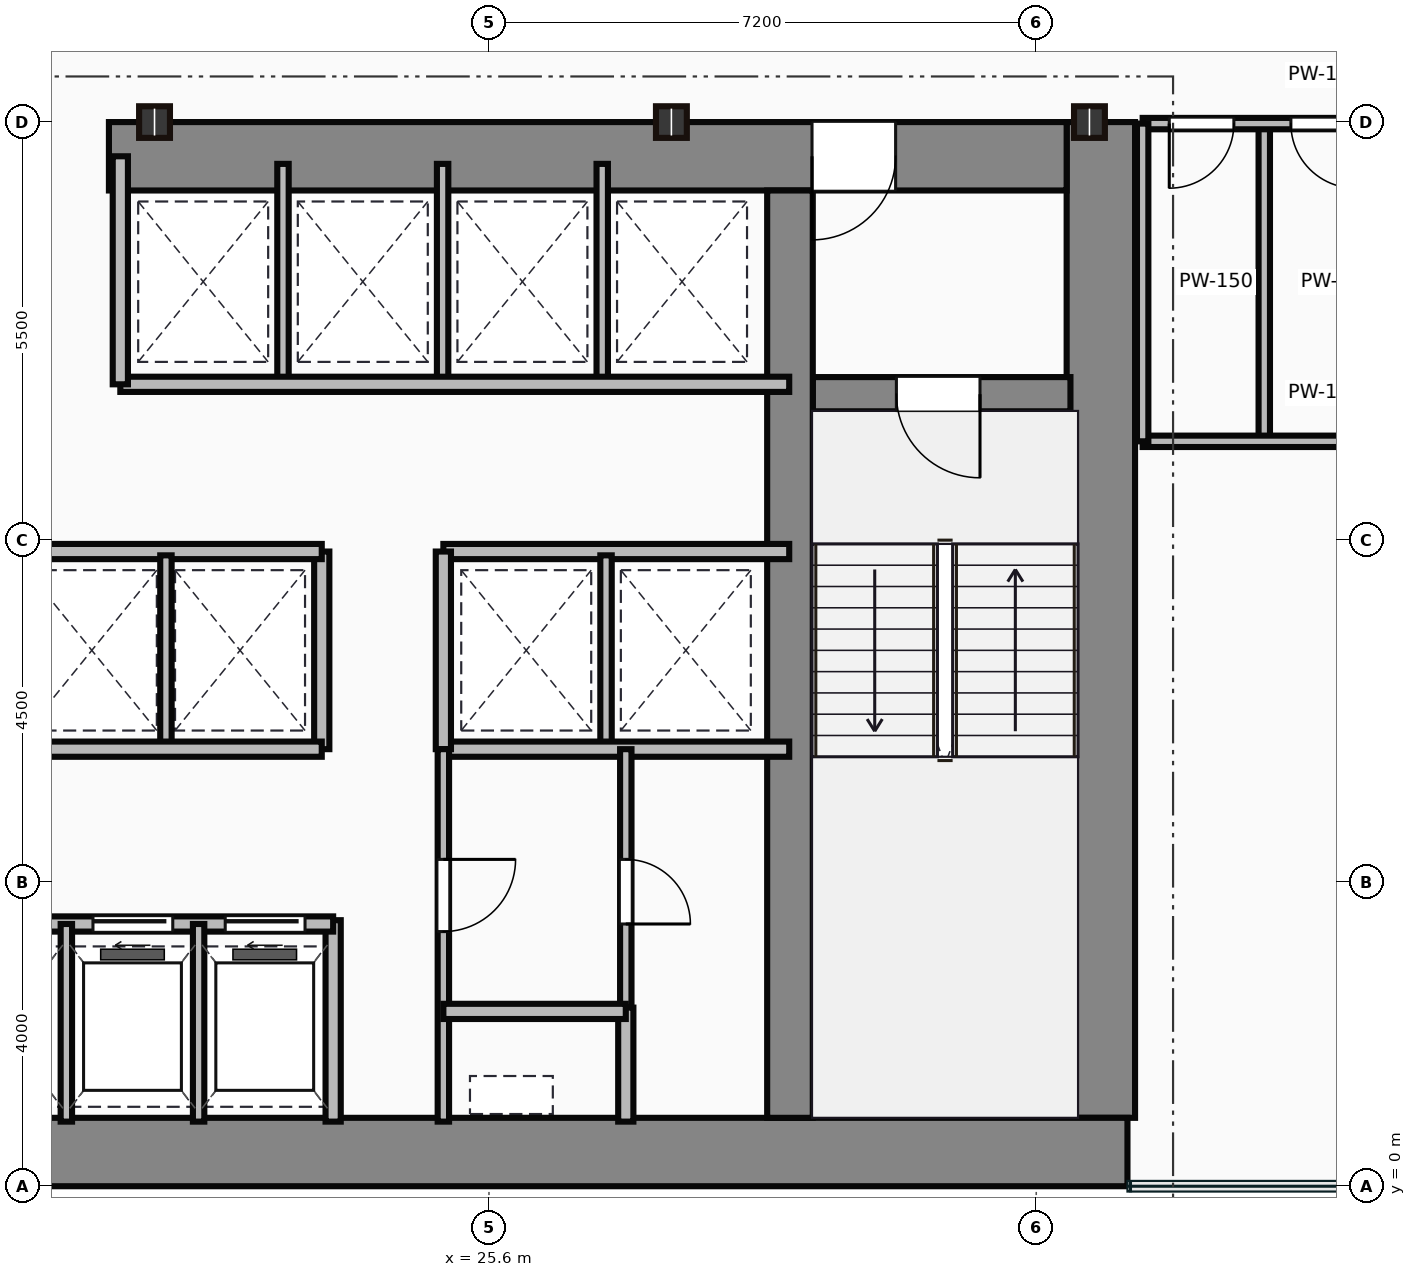
"""IFC4 building model, lengths in metres.
Left out: names, types, materials, properties, quantities, classifications, styles, units other than length and angle.
Written with IfcOpenShell. Run it as: python <this file> out.ifc"""

import sys

from ifc_helpers import new_model, si_unit, direction, frame, frame_2d, origin, origin_2d, place, context, subcontext, project, spatial, rectangle, i_section, extrude, source, transform, mapped, element, fill, save


model = new_model("IFC4")
c1 = context("Model", 3, precision=1e-05, world=origin(), true_north=direction((0.0, 1.0)))
c2 = subcontext(c1, "Body", "Model", "MODEL_VIEW")
j1 = project(units=[si_unit("LENGTHUNIT", "METRE"), si_unit("PLANEANGLEUNIT", "RADIAN")], contexts=[c1])
p1 = place(None, origin())
s1 = spatial("IfcSite", under=j1, at=p1, CompositionType="ELEMENT")
p2 = place(p1, origin())
s2 = spatial("IfcBuilding", under=s1, at=p2, CompositionType="ELEMENT")
p3 = place(p2, frame((0.0, 0.0, 65.35)))
s3 = spatial("IfcBuildingStorey", under=s2, at=p3, CompositionType="ELEMENT", Elevation=65.35)
m1 = source(origin(), c2, "Body", "SweptSolid", [
    extrude(rectangle(XDim=29.5, YDim=0.9, at=frame_2d((14.75, 0.0))), origin(), (0.0, 0.0, 1.0), 3.65),
])
p4 = place(p3, frame((4.5, 0.45, 0.0), z_axis=(0.0, 0.0, 1.0), x_axis=(1.0, 0.0, 0.0)))
e1 = element("IfcWall", 1, at=p4, inside=s3, PredefinedType="SHEAR", context=c2, shape_type="MappedRepresentation", body=[
    mapped(m1, transform((0.0, 0.0, 0.0))),
])
m2 = source(origin(), c2, "Body", "SweptSolid", [
    extrude(rectangle(XDim=13.1, YDim=0.9, at=frame_2d((6.55, 0.0))), origin(), (0.0, 0.0, 1.0), 3.65),
])
p5 = place(p3, frame((33.65, 0.9, 0.0), z_axis=(0.0, 0.0, 1.0), x_axis=(0.0, 1.0, 0.0)))
e2 = element("IfcWall", 2, at=p5, inside=s3, PredefinedType="SHEAR", context=c2, shape_type="MappedRepresentation", body=[
    mapped(m2, transform((0.0, 0.0, 0.0))),
])
m3 = source(origin(), c2, "Body", "SweptSolid", [
    extrude(rectangle(XDim=12.6, YDim=0.9, at=frame_2d((6.3, 0.0))), origin(), (0.0, 0.0, 1.0), 3.65),
])
p6 = place(p3, frame((20.6, 13.55, 0.0), z_axis=(0.0, 0.0, 1.0), x_axis=(1.0, 0.0, 0.0)))
e3 = element("IfcWall", 3, at=p6, inside=s3, PredefinedType="SHEAR", context=c2, shape_type="MappedRepresentation", body=[
    mapped(m3, transform((0.0, 0.0, 0.0))),
])
p7 = place(p6, frame((9.25, 0.0, 0.0)))
e4 = element("IfcOpeningElement", 4, at=p7, cuts=e3, PredefinedType="OPENING", context=c2, shape_type="SweptSolid", body=[
    extrude(rectangle(XDim=1.1, YDim=2.15, at=frame_2d((0.55, 1.075))), frame((0.0, 0.46, 0.0), z_axis=(0.0, -1.0, 0.0), x_axis=(1.0, 0.0, 0.0)), (0.0, 0.0, 1.0), 0.92),
])
m4 = source(origin(), c2, "Body", "SweptSolid", [
    extrude(rectangle(XDim=12.2, YDim=0.6, at=frame_2d((6.1, 0.0))), origin(), (0.0, 0.0, 1.0), 3.65),
])
p8 = place(p3, frame((29.56, 0.9, 0.0), z_axis=(0.0, 0.0, 1.0), x_axis=(0.0, 1.0, 0.0)))
e5 = element("IfcWall", 5, at=p8, inside=s3, PredefinedType="SHEAR", context=c2, shape_type="MappedRepresentation", body=[
    mapped(m4, transform((0.0, 0.0, 0.0))),
])
m5 = source(origin(), c2, "Body", "SweptSolid", [
    extrude(rectangle(XDim=3.39, YDim=0.45, at=frame_2d((1.695, 0.0))), origin(), (0.0, 0.0, 1.0), 3.65),
])
p9 = place(p3, frame((29.86, 10.42, 0.0), z_axis=(0.0, 0.0, 1.0), x_axis=(1.0, 0.0, 0.0)))
e6 = element("IfcWall", 6, at=p9, inside=s3, PredefinedType="SHEAR", context=c2, shape_type="MappedRepresentation", body=[
    mapped(m5, transform((0.0, 0.0, 0.0))),
])
p10 = place(p9, frame((1.1, 0.0, 0.0)))
e7 = element("IfcOpeningElement", 7, at=p10, cuts=e6, PredefinedType="OPENING", context=c2, shape_type="SweptSolid", body=[
    extrude(rectangle(XDim=1.1, YDim=2.15, at=frame_2d((0.55, 1.075))), frame((0.0, 0.235, 0.0), z_axis=(0.0, -1.0, 0.0), x_axis=(1.0, 0.0, 0.0)), (0.0, 0.0, 1.0), 0.47),
])
m6 = source(origin(), c2, "Body", "SweptSolid", [
    extrude(i_section(OverallWidth=0.406, OverallDepth=0.416, WebThickness=0.03, FlangeThickness=0.048, at=origin_2d()), origin(), (0.0, 0.0, 1.0), 3.65),
])
for number, where, z_axis, x_axis in (
    (8, (21.2, 14.0, 0.0), (0.0, 0.0, 1.0), (1.0, 0.0, 0.0)),
    (9, (28.0, 14.0, 0.0), (0.0, 0.0, 1.0), (1.0, 0.0, 0.0)),
    (10, (33.5, 14.0, 0.0), (0.0, 0.0, 1.0), (1.0, 0.0, 0.0)),
):
    element("IfcColumn", number, at=place(p3, frame(where, z_axis=z_axis, x_axis=x_axis)), inside=s3, PredefinedType="COLUMN", context=c2, shape_type="MappedRepresentation", body=[
        mapped(m6, transform((0.0, 0.0, 0.0))),
    ])
m7 = source(origin(), c2, "Body", "SweptSolid", [
    extrude(rectangle(XDim=10.5, YDim=0.2, at=frame_2d((5.25, 0.0))), origin(), (0.0, 0.0, 1.0), 3.4),
])
p11 = place(p3, frame((13.05, 3.45, 0.0), z_axis=(0.0, 0.0, 1.0), x_axis=(1.0, 0.0, 0.0)))
e11 = element("IfcWall", 11, at=p11, inside=s3, PredefinedType="PARTITIONING", context=c2, shape_type="MappedRepresentation", body=[
    mapped(m7, transform((0.0, 0.0, 0.0))),
])
p12 = place(p11, frame((0.38, 0.0, 0.0)))
e12 = element("IfcOpeningElement", 12, at=p12, cuts=e11, PredefinedType="OPENING", context=c2, shape_type="SweptSolid", body=[
    extrude(rectangle(XDim=1.05, YDim=2.15, at=frame_2d((0.525, 1.075))), frame((0.0, 0.11, 0.0), z_axis=(0.0, -1.0, 0.0), x_axis=(1.0, 0.0, 0.0)), (0.0, 0.0, 1.0), 0.22),
])
p13 = place(p11, frame((2.12, 0.0, 0.0)))
e13 = element("IfcOpeningElement", 13, at=p13, cuts=e11, PredefinedType="OPENING", context=c2, shape_type="SweptSolid", body=[
    extrude(rectangle(XDim=1.05, YDim=2.15, at=frame_2d((0.525, 1.075))), frame((0.0, 0.11, 0.0), z_axis=(0.0, -1.0, 0.0), x_axis=(1.0, 0.0, 0.0)), (0.0, 0.0, 1.0), 0.22),
])
p14 = place(p11, frame((3.86, 0.0, 0.0)))
e14 = element("IfcOpeningElement", 14, at=p14, cuts=e11, PredefinedType="OPENING", context=c2, shape_type="SweptSolid", body=[
    extrude(rectangle(XDim=1.05, YDim=2.15, at=frame_2d((0.525, 1.075))), frame((0.0, 0.11, 0.0), z_axis=(0.0, -1.0, 0.0), x_axis=(1.0, 0.0, 0.0)), (0.0, 0.0, 1.0), 0.22),
])
p15 = place(p11, frame((5.6, 0.0, 0.0)))
e15 = element("IfcOpeningElement", 15, at=p15, cuts=e11, PredefinedType="OPENING", context=c2, shape_type="SweptSolid", body=[
    extrude(rectangle(XDim=1.05, YDim=2.15, at=frame_2d((0.525, 1.075))), frame((0.0, 0.11, 0.0), z_axis=(0.0, -1.0, 0.0), x_axis=(1.0, 0.0, 0.0)), (0.0, 0.0, 1.0), 0.22),
])
p16 = place(p11, frame((7.34, 0.0, 0.0)))
e16 = element("IfcOpeningElement", 16, at=p16, cuts=e11, PredefinedType="OPENING", context=c2, shape_type="SweptSolid", body=[
    extrude(rectangle(XDim=1.05, YDim=2.15, at=frame_2d((0.525, 1.075))), frame((0.0, 0.11, 0.0), z_axis=(0.0, -1.0, 0.0), x_axis=(1.0, 0.0, 0.0)), (0.0, 0.0, 1.0), 0.22),
])
p17 = place(p11, frame((9.08, 0.0, 0.0)))
e17 = element("IfcOpeningElement", 17, at=p17, cuts=e11, PredefinedType="OPENING", context=c2, shape_type="SweptSolid", body=[
    extrude(rectangle(XDim=1.05, YDim=2.15, at=frame_2d((0.525, 1.075))), frame((0.0, 0.11, 0.0), z_axis=(0.0, -1.0, 0.0), x_axis=(1.0, 0.0, 0.0)), (0.0, 0.0, 1.0), 0.22),
])
m8 = source(origin(), c2, "Body", "SweptSolid", [
    extrude(rectangle(XDim=2.65, YDim=0.2, at=frame_2d((1.325, 0.0))), origin(), (0.0, 0.0, 1.0), 3.4),
])
p18 = place(p3, frame((23.55, 0.85, 0.0), z_axis=(0.0, 0.0, 1.0), x_axis=(0.0, 1.0, 0.0)))
e18 = element("IfcWall", 18, at=p18, inside=s3, PredefinedType="PARTITIONING", context=c2, shape_type="MappedRepresentation", body=[
    mapped(m8, transform((0.0, 0.0, 0.0))),
])
m9 = source(origin(), c2, "Body", "SweptSolid", [
    extrude(rectangle(XDim=2.6, YDim=0.15, at=frame_2d((1.3, 0.0))), origin(), (0.0, 0.0, 1.0), 3.4),
])
for number, where, z_axis, x_axis in (
    (19, (20.04, 0.85, 0.0), (0.0, 0.0, 1.0), (0.0, 1.0, 0.0)),
    (20, (21.78, 0.85, 0.0), (0.0, 0.0, 1.0), (0.0, 1.0, 0.0)),
):
    element("IfcWall", number, at=place(p3, frame(where, z_axis=z_axis, x_axis=x_axis)), inside=s3, PredefinedType="PARTITIONING", context=c2, shape_type="MappedRepresentation", body=[
        mapped(m9, transform((0.0, 0.0, 0.0))),
    ])
m10 = source(origin(), c2, "Body", "SweptSolid", [
    extrude(rectangle(XDim=11.85, YDim=0.2, at=frame_2d((5.925, 0.0))), origin(), (0.0, 0.0, 1.0), 3.4),
])
for number, where, z_axis, x_axis in (
    (21, (11.55, 5.75, 0.0), (0.0, 0.0, 1.0), (1.0, 0.0, 0.0)),
    (22, (11.55, 8.35, 0.0), (0.0, 0.0, 1.0), (1.0, 0.0, 0.0)),
):
    element("IfcWall", number, at=place(p3, frame(where, z_axis=z_axis, x_axis=x_axis)), inside=s3, PredefinedType="PARTITIONING", context=c2, shape_type="MappedRepresentation", body=[
        mapped(m10, transform((0.0, 0.0, 0.0))),
    ])
m11 = source(origin(), c2, "Body", "SweptSolid", [
    extrude(rectangle(XDim=2.6, YDim=0.2, at=frame_2d((1.3, 0.0))), origin(), (0.0, 0.0, 1.0), 3.4),
])
p19 = place(p3, frame((23.4, 5.75, 0.0), z_axis=(0.0, 0.0, 1.0), x_axis=(0.0, 1.0, 0.0)))
e23 = element("IfcWall", 23, at=p19, inside=s3, PredefinedType="PARTITIONING", context=c2, shape_type="MappedRepresentation", body=[
    mapped(m11, transform((0.0, 0.0, 0.0))),
])
m12 = source(origin(), c2, "Body", "SweptSolid", [
    extrude(rectangle(XDim=2.5, YDim=0.15, at=frame_2d((1.25, 0.0))), origin(), (0.0, 0.0, 1.0), 3.4),
])
p20 = place(p3, frame((21.35, 5.8, 0.0), z_axis=(0.0, 0.0, 1.0), x_axis=(0.0, 1.0, 0.0)))
e24 = element("IfcWall", 24, at=p20, inside=s3, PredefinedType="PARTITIONING", context=c2, shape_type="MappedRepresentation", body=[
    mapped(m12, transform((0.0, 0.0, 0.0))),
])
m13 = source(origin(), c2, "Body", "SweptSolid", [
    extrude(rectangle(XDim=8.8, YDim=0.2, at=frame_2d((4.4, 0.0))), origin(), (0.0, 0.0, 1.0), 3.4),
])
p21 = place(p3, frame((20.75, 10.55, 0.0), z_axis=(0.0, 0.0, 1.0), x_axis=(1.0, 0.0, 0.0)))
e25 = element("IfcWall", 25, at=p21, inside=s3, PredefinedType="PARTITIONING", context=c2, shape_type="MappedRepresentation", body=[
    mapped(m13, transform((0.0, 0.0, 0.0))),
])
m14 = source(origin(), c2, "Body", "SweptSolid", [
    extrude(rectangle(XDim=3.0, YDim=0.2, at=frame_2d((1.5, 0.0))), origin(), (0.0, 0.0, 1.0), 3.4),
])
p22 = place(p3, frame((20.75, 10.55, 0.0), z_axis=(0.0, 0.0, 1.0), x_axis=(0.0, 1.0, 0.0)))
e26 = element("IfcWall", 26, at=p22, inside=s3, PredefinedType="PARTITIONING", context=c2, shape_type="MappedRepresentation", body=[
    mapped(m14, transform((0.0, 0.0, 0.0))),
])
m15 = source(origin(), c2, "Body", "SweptSolid", [
    extrude(rectangle(XDim=2.85, YDim=0.15, at=frame_2d((1.425, 0.0))), origin(), (0.0, 0.0, 1.0), 3.4),
])
for number, where, z_axis, x_axis in (
    (27, (22.89, 10.6, 0.0), (0.0, 0.0, 1.0), (0.0, 1.0, 0.0)),
    (28, (24.99, 10.6, 0.0), (0.0, 0.0, 1.0), (0.0, 1.0, 0.0)),
    (29, (27.09, 10.6, 0.0), (0.0, 0.0, 1.0), (0.0, 1.0, 0.0)),
):
    element("IfcWall", number, at=place(p3, frame(where, z_axis=z_axis, x_axis=x_axis)), inside=s3, PredefinedType="PARTITIONING", context=c2, shape_type="MappedRepresentation", body=[
        mapped(m15, transform((0.0, 0.0, 0.0))),
    ])
m16 = source(origin(), c2, "Body", "SweptSolid", [
    extrude(rectangle(XDim=4.55, YDim=0.2, at=frame_2d((2.275, 0.0))), origin(), (0.0, 0.0, 1.0), 3.4),
])
for number, where, z_axis, x_axis in (
    (30, (25.0, 8.35, 0.0), (0.0, 0.0, 1.0), (1.0, 0.0, 0.0)),
    (31, (25.0, 5.75, 0.0), (0.0, 0.0, 1.0), (1.0, 0.0, 0.0)),
):
    element("IfcWall", number, at=place(p3, frame(where, z_axis=z_axis, x_axis=x_axis)), inside=s3, PredefinedType="PARTITIONING", context=c2, shape_type="MappedRepresentation", body=[
        mapped(m16, transform((0.0, 0.0, 0.0))),
    ])
p23 = place(p3, frame((25.0, 5.75, 0.0), z_axis=(0.0, 0.0, 1.0), x_axis=(0.0, 1.0, 0.0)))
e32 = element("IfcWall", 32, at=p23, inside=s3, PredefinedType="PARTITIONING", context=c2, shape_type="MappedRepresentation", body=[
    mapped(m11, transform((0.0, 0.0, 0.0))),
])
p24 = place(p3, frame((27.14, 5.8, 0.0), z_axis=(0.0, 0.0, 1.0), x_axis=(0.0, 1.0, 0.0)))
e33 = element("IfcWall", 33, at=p24, inside=s3, PredefinedType="PARTITIONING", context=c2, shape_type="MappedRepresentation", body=[
    mapped(m12, transform((0.0, 0.0, 0.0))),
])
m17 = source(origin(), c2, "Body", "SweptSolid", [
    extrude(rectangle(XDim=4.9, YDim=0.15, at=frame_2d((2.45, 0.0))), origin(), (0.0, 0.0, 1.0), 3.4),
])
p25 = place(p3, frame((25.0, 0.85, 0.0), z_axis=(0.0, 0.0, 1.0), x_axis=(0.0, 1.0, 0.0)))
e34 = element("IfcWall", 34, at=p25, inside=s3, PredefinedType="PARTITIONING", context=c2, shape_type="MappedRepresentation", body=[
    mapped(m17, transform((0.0, 0.0, 0.0))),
])
p26 = place(p25, frame((2.5, 0.0, 0.0)))
e35 = element("IfcOpeningElement", 35, at=p26, cuts=e34, PredefinedType="OPENING", context=c2, shape_type="SweptSolid", body=[
    extrude(rectangle(XDim=0.95, YDim=2.15, at=frame_2d((0.475, 1.075))), frame((0.0, 0.085, 0.0), z_axis=(0.0, -1.0, 0.0), x_axis=(1.0, 0.0, 0.0)), (0.0, 0.0, 1.0), 0.17),
])
m18 = source(origin(), c2, "Body", "SweptSolid", [
    extrude(rectangle(XDim=2.4, YDim=0.2, at=frame_2d((1.2, 0.0))), origin(), (0.0, 0.0, 1.0), 3.4),
])
p27 = place(p3, frame((25.0, 2.3, 0.0), z_axis=(0.0, 0.0, 1.0), x_axis=(1.0, 0.0, 0.0)))
e36 = element("IfcWall", 36, at=p27, inside=s3, PredefinedType="PARTITIONING", context=c2, shape_type="MappedRepresentation", body=[
    mapped(m18, transform((0.0, 0.0, 0.0))),
])
m19 = source(origin(), c2, "Body", "SweptSolid", [
    extrude(rectangle(XDim=1.5, YDim=0.2, at=frame_2d((0.75, 0.0))), origin(), (0.0, 0.0, 1.0), 3.4),
])
p28 = place(p3, frame((27.4, 0.85, 0.0), z_axis=(0.0, 0.0, 1.0), x_axis=(0.0, 1.0, 0.0)))
e37 = element("IfcWall", 37, at=p28, inside=s3, PredefinedType="PARTITIONING", context=c2, shape_type="MappedRepresentation", body=[
    mapped(m19, transform((0.0, 0.0, 0.0))),
])
m20 = source(origin(), c2, "Body", "SweptSolid", [
    extrude(rectangle(XDim=3.4, YDim=0.15, at=frame_2d((1.7, 0.0))), origin(), (0.0, 0.0, 1.0), 3.4),
])
p29 = place(p3, frame((27.4, 2.35, 0.0), z_axis=(0.0, 0.0, 1.0), x_axis=(0.0, 1.0, 0.0)))
e38 = element("IfcWall", 38, at=p29, inside=s3, PredefinedType="PARTITIONING", context=c2, shape_type="MappedRepresentation", body=[
    mapped(m20, transform((0.0, 0.0, 0.0))),
])
p30 = place(p29, frame((1.1, 0.0, 0.0)))
e39 = element("IfcOpeningElement", 39, at=p30, cuts=e38, PredefinedType="OPENING", context=c2, shape_type="SweptSolid", body=[
    extrude(rectangle(XDim=0.85, YDim=2.1, at=frame_2d((0.425, 1.05))), frame((0.0, 0.085, 0.0), z_axis=(0.0, -1.0, 0.0), x_axis=(1.0, 0.0, 0.0)), (0.0, 0.0, 1.0), 0.17),
])
m21 = source(origin(), c2, "Body", "SweptSolid", [
    extrude(rectangle(XDim=4.8, YDim=0.15, at=frame_2d((2.4, 0.0))), origin(), (0.0, 0.0, 1.0), 2.625),
])
p31 = place(p3, frame((34.2, 13.98, 0.0), z_axis=(0.0, 0.0, 1.0), x_axis=(1.0, 0.0, 0.0)))
e40 = element("IfcWall", 40, at=p31, inside=s3, PredefinedType="PARTITIONING", context=c2, shape_type="MappedRepresentation", body=[
    mapped(m21, transform((0.0, 0.0, 0.0))),
])
p32 = place(p31, frame((0.35, 0.0, 0.0)))
e41 = element("IfcOpeningElement", 41, at=p32, cuts=e40, PredefinedType="OPENING", context=c2, shape_type="SweptSolid", body=[
    extrude(rectangle(XDim=0.85, YDim=2.1, at=frame_2d((0.425, 1.05))), frame((0.0, 0.085, 0.0), z_axis=(0.0, -1.0, 0.0), x_axis=(1.0, 0.0, 0.0)), (0.0, 0.0, 1.0), 0.17),
])
p33 = place(p31, frame((1.95, 0.0, 0.0)))
e42 = element("IfcOpeningElement", 42, at=p33, cuts=e40, PredefinedType="OPENING", context=c2, shape_type="SweptSolid", body=[
    extrude(rectangle(XDim=0.85, YDim=2.1, at=frame_2d((0.425, 1.05))), frame((0.0, 0.085, 0.0), z_axis=(0.0, -1.0, 0.0), x_axis=(1.0, 0.0, 0.0)), (0.0, 0.0, 1.0), 0.17),
])
p34 = place(p31, frame((3.5, 0.0, 0.0)))
e43 = element("IfcOpeningElement", 43, at=p34, cuts=e40, PredefinedType="OPENING", context=c2, shape_type="SweptSolid", body=[
    extrude(rectangle(XDim=0.9, YDim=2.1, at=frame_2d((0.45, 1.05))), frame((0.0, 0.085, 0.0), z_axis=(0.0, -1.0, 0.0), x_axis=(1.0, 0.0, 0.0)), (0.0, 0.0, 1.0), 0.17),
])
m22 = source(origin(), c2, "Body", "SweptSolid", [
    extrude(rectangle(XDim=4.8, YDim=0.15, at=frame_2d((2.4, 0.0))), origin(), (0.0, 0.0, 1.0), 3.4),
])
p35 = place(p3, frame((34.2, 9.8, 0.0), z_axis=(0.0, 0.0, 1.0), x_axis=(1.0, 0.0, 0.0)))
e44 = element("IfcWall", 44, at=p35, inside=s3, PredefinedType="PARTITIONING", context=c2, shape_type="MappedRepresentation", body=[
    mapped(m22, transform((0.0, 0.0, 0.0))),
])
m23 = source(origin(), c2, "Body", "SweptSolid", [
    extrude(rectangle(XDim=4.18, YDim=0.15, at=frame_2d((2.09, 0.0))), origin(), (0.0, 0.0, 1.0), 3.4),
])
for number, where, z_axis, x_axis in (
    (45, (34.2, 9.8, 0.0), (0.0, 0.0, 1.0), (0.0, 1.0, 0.0)),
    (46, (35.8, 9.8, 0.0), (0.0, 0.0, 1.0), (0.0, 1.0, 0.0)),
):
    element("IfcWall", number, at=place(p3, frame(where, z_axis=z_axis, x_axis=x_axis)), inside=s3, PredefinedType="PARTITIONING", context=c2, shape_type="MappedRepresentation", body=[
        mapped(m23, transform((0.0, 0.0, 0.0))),
    ])
m24 = source(origin(), c2, "Body", "SweptSolid", [
    extrude(rectangle(XDim=1.1, YDim=2.15, at=frame_2d((0.55, 1.075))), frame((0.0, 0.025, 0.0), z_axis=(0.0, -1.0, 0.0), x_axis=(1.0, 0.0, 0.0)), (0.0, 0.0, 1.0), 0.05),
])
p36 = place(p10, frame((1.1, 0.0, 0.0), z_axis=(0.0, 0.0, 1.0), x_axis=(-1.0, 0.0, 0.0)))
e47 = element("IfcDoor", 47, at=p36, inside=s3, OperationType="SINGLE_SWING_RIGHT", PredefinedType="DOOR", context=c2, shape_type="MappedRepresentation", body=[
    mapped(m24, transform((0.0, 0.0, 0.0))),
])
fill(e7, e47)
p37 = place(p7, origin())
e48 = element("IfcDoor", 48, at=p37, inside=s3, OperationType="SINGLE_SWING_LEFT", PredefinedType="DOOR", context=c2, shape_type="MappedRepresentation", body=[
    mapped(m24, transform((0.0, 0.0, 0.0))),
])
fill(e4, e48)
m25 = source(origin(), c2, "Body", "SweptSolid", [
    extrude(rectangle(XDim=1.05, YDim=2.15, at=frame_2d((0.525, 1.075))), frame((0.0, 0.025, 0.0), z_axis=(0.0, -1.0, 0.0), x_axis=(1.0, 0.0, 0.0)), (0.0, 0.0, 1.0), 0.05),
])
p38 = place(p16, origin())
e49 = element("IfcDoor", 49, at=p38, inside=s3, OperationType="SLIDING_TO_LEFT", PredefinedType="DOOR", context=c2, shape_type="MappedRepresentation", body=[
    mapped(m25, transform((0.0, 0.0, 0.0))),
])
fill(e16, e49)
p39 = place(p17, origin())
e50 = element("IfcDoor", 50, at=p39, inside=s3, OperationType="SLIDING_TO_LEFT", PredefinedType="DOOR", context=c2, shape_type="MappedRepresentation", body=[
    mapped(m25, transform((0.0, 0.0, 0.0))),
])
fill(e17, e50)
m26 = source(origin(), c2, "Body", "SweptSolid", [
    extrude(rectangle(XDim=0.95, YDim=2.15, at=frame_2d((0.475, 1.075))), frame((0.0, 0.025, 0.0), z_axis=(0.0, -1.0, 0.0), x_axis=(1.0, 0.0, 0.0)), (0.0, 0.0, 1.0), 0.05),
])
p40 = place(p26, origin())
e51 = element("IfcDoor", 51, at=p40, inside=s3, OperationType="SINGLE_SWING_RIGHT", PredefinedType="DOOR", context=c2, shape_type="MappedRepresentation", body=[
    mapped(m26, transform((0.0, 0.0, 0.0))),
])
fill(e35, e51)
m27 = source(origin(), c2, "Body", "SweptSolid", [
    extrude(rectangle(XDim=0.85, YDim=2.1, at=frame_2d((0.425, 1.05))), frame((0.0, 0.025, 0.0), z_axis=(0.0, -1.0, 0.0), x_axis=(1.0, 0.0, 0.0)), (0.0, 0.0, 1.0), 0.05),
])
p41 = place(p30, frame((0.85, 0.0, 0.0), z_axis=(0.0, 0.0, 1.0), x_axis=(-1.0, 0.0, 0.0)))
e52 = element("IfcDoor", 52, at=p41, inside=s3, OperationType="SINGLE_SWING_LEFT", PredefinedType="DOOR", context=c2, shape_type="MappedRepresentation", body=[
    mapped(m27, transform((0.0, 0.0, 0.0))),
])
fill(e39, e52)
p42 = place(p32, frame((0.85, 0.0, 0.0), z_axis=(0.0, 0.0, 1.0), x_axis=(-1.0, 0.0, 0.0)))
e53 = element("IfcDoor", 53, at=p42, inside=s3, OperationType="SINGLE_SWING_LEFT", PredefinedType="DOOR", context=c2, shape_type="MappedRepresentation", body=[
    mapped(m27, transform((0.0, 0.0, 0.0))),
])
fill(e41, e53)
p43 = place(p33, frame((0.85, 0.0, 0.0), z_axis=(0.0, 0.0, 1.0), x_axis=(-1.0, 0.0, 0.0)))
e54 = element("IfcDoor", 54, at=p43, inside=s3, OperationType="SINGLE_SWING_RIGHT", PredefinedType="DOOR", context=c2, shape_type="MappedRepresentation", body=[
    mapped(m27, transform((0.0, 0.0, 0.0))),
])
fill(e42, e54)
save(model, sys.argv[1])
